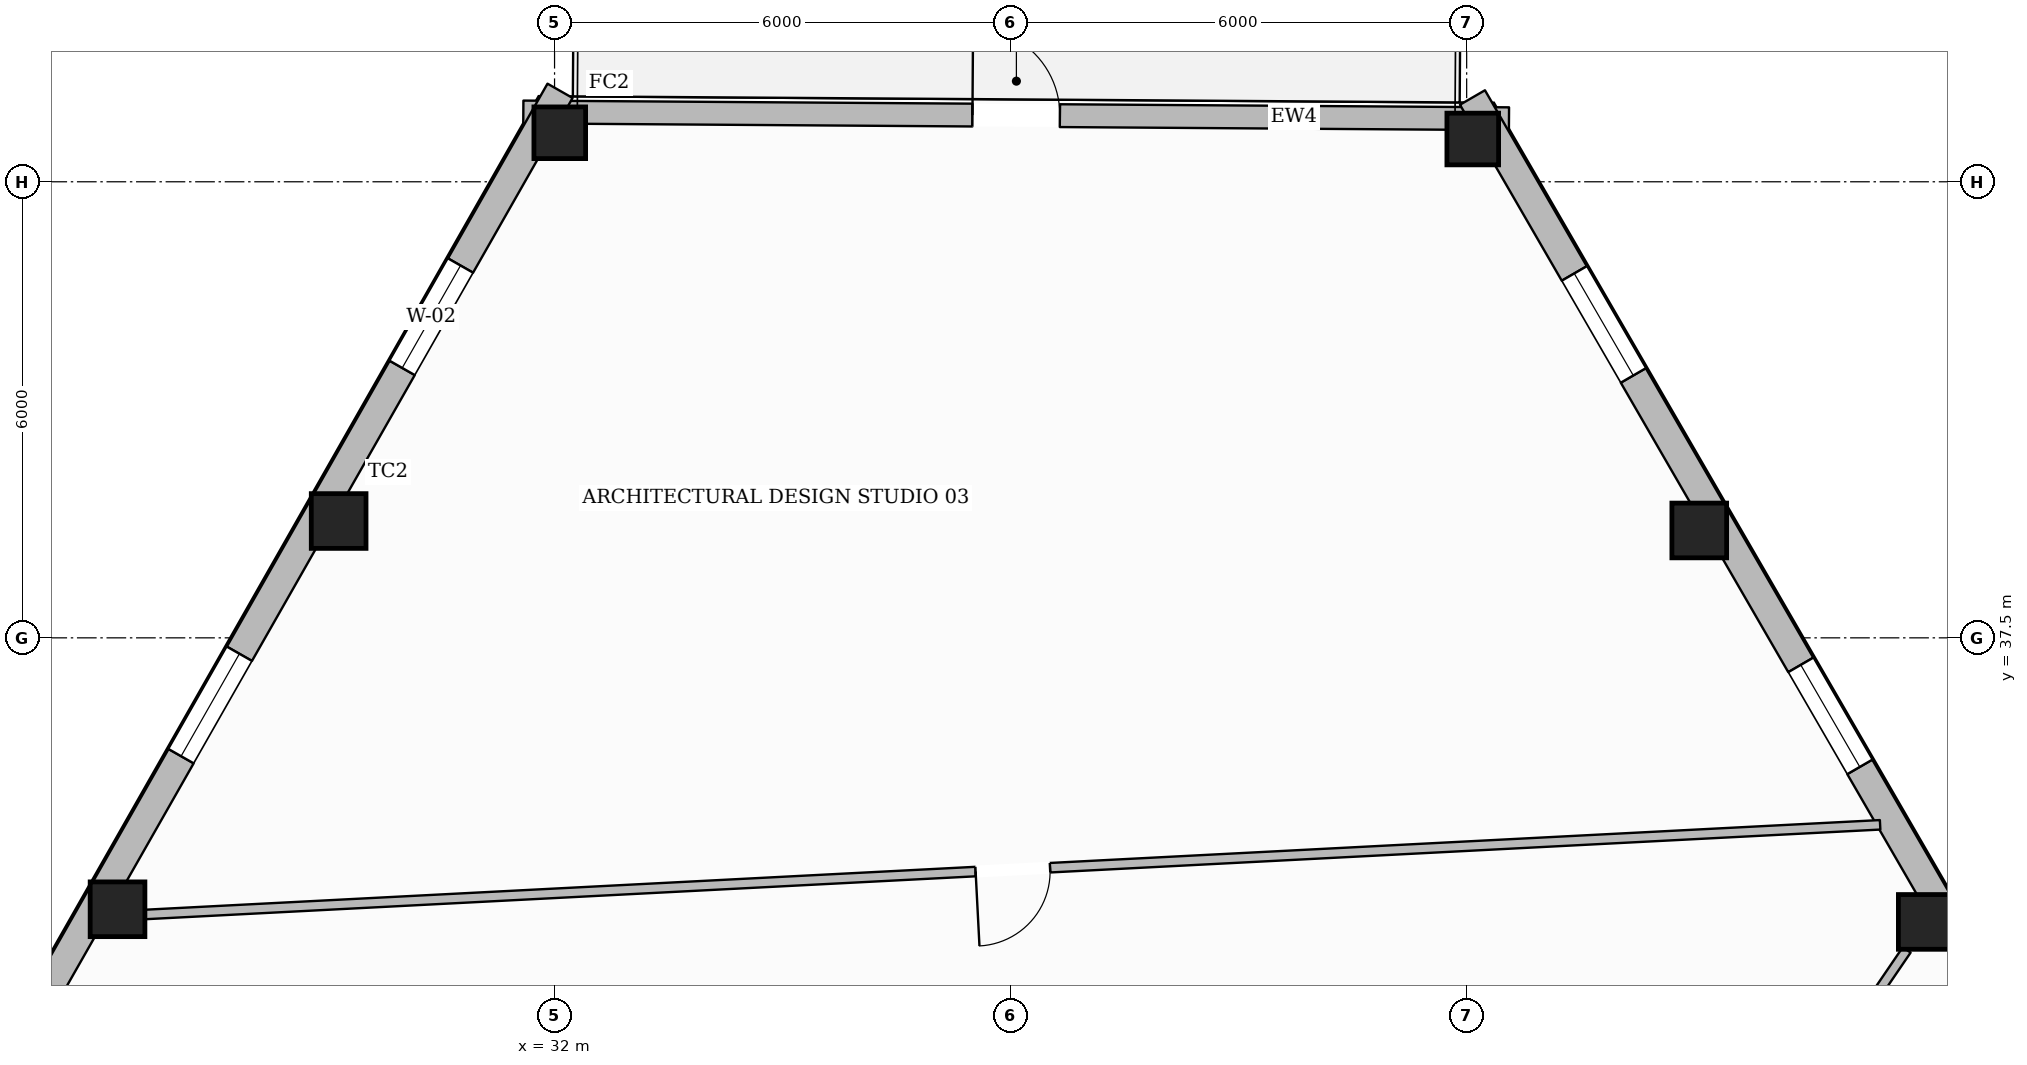
"""IFC4 building model, lengths in metres.
Left out: names, types, materials, properties, quantities, classifications, styles, units other than length and angle.
Written with IfcOpenShell. Run it as: python <this file> out.ifc"""

import sys

from ifc_helpers import new_model, si_unit, direction, frame, frame_2d, origin, origin_2d, place, context, subcontext, project, spatial, rectangle, hollow_rectangle, extrude, element, fill, save


model = new_model("IFC4")
c1 = context("Model", 3, precision=1e-05, world=origin(), true_north=direction((0.0, 1.0)))
c2 = subcontext(c1, "Body", "Model", "MODEL_VIEW")
j1 = project(units=[si_unit("LENGTHUNIT", "METRE"), si_unit("PLANEANGLEUNIT", "RADIAN")], contexts=[c1])
p1 = place(None, origin())
s1 = spatial("IfcSite", under=j1, at=p1, CompositionType="ELEMENT")
p2 = place(p1, origin())
s2 = spatial("IfcBuilding", under=s1, at=p2, CompositionType="ELEMENT")
p3 = place(p2, frame((0.0, 0.0, 112.45)))
s3 = spatial("IfcBuildingStorey", under=s2, at=p3, CompositionType="ELEMENT", Elevation=112.45)
p4 = place(p3, frame((32.069, 44.145, 0.0), z_axis=(0.0, 0.0, 1.0), x_axis=(1.0, 0.0, 0.0)))
e1 = element("IfcColumn", 1, at=p4, inside=s3, PredefinedType="COLUMN", context=c2, shape_type="SweptSolid", body=[
    extrude(hollow_rectangle(XDim=0.68, YDim=0.68, WallThickness=0.03, at=origin_2d()), origin(), (0.0, 0.0, 1.0), 3.6),
])
for number, where, z_axis, x_axis in (
    (2, (29.16, 39.037, 0.0), (0.0, 0.0, 1.0), (1.0, 0.0, 0.0)),
    (3, (26.25, 33.929, 0.0), (0.0, 0.0, 1.0), (1.0, 0.0, 0.0)),
    (4, (50.04, 33.763, 0.0), (0.0, 0.0, 1.0), (1.0, 0.0, 0.0)),
    (5, (47.06, 38.913, 0.0), (0.0, 0.0, 1.0), (1.0, 0.0, 0.0)),
):
    element("IfcColumn", number, at=place(p3, frame(where, z_axis=z_axis, x_axis=x_axis)), inside=s3, PredefinedType="COLUMN", context=c2, shape_type="SweptSolid", body=[
        extrude(hollow_rectangle(XDim=0.72, YDim=0.72, WallThickness=0.032, at=origin_2d()), origin(), (0.0, 0.0, 1.0), 3.6),
    ])
p5 = place(p3, frame((44.08, 44.062, 0.0), z_axis=(0.0, 0.0, 1.0), x_axis=(1.0, 0.0, 0.0)))
e6 = element("IfcColumn", 6, at=p5, inside=s3, PredefinedType="COLUMN", context=c2, shape_type="SweptSolid", body=[
    extrude(hollow_rectangle(XDim=0.68, YDim=0.68, WallThickness=0.03, at=origin_2d()), origin(), (0.0, 0.0, 1.0), 3.6),
])
p6 = place(p3, frame((31.589, 44.418, 0.0), z_axis=(0.0, 0.0, 1.0), x_axis=(0.999976517764, -0.00685302279, 0.0)))
e7 = element("IfcWall", 7, at=p6, inside=s3, PredefinedType="STANDARD", context=c2, shape_type="SweptSolid", body=[
    extrude(rectangle(XDim=12.968, YDim=0.3, at=frame_2d((6.484, 0.0))), origin(), (0.0, 0.0, 1.0), 3.059),
])
p7 = place(p6, frame((5.909, 0.0, 0.0)))
e8 = element("IfcOpeningElement", 8, at=p7, cuts=e7, PredefinedType="OPENING", context=c2, shape_type="SweptSolid", body=[
    extrude(rectangle(XDim=1.15, YDim=2.2, at=frame_2d((0.575, 1.1))), frame((0.0, 0.16, 0.0), z_axis=(0.0, -1.0, 0.0), x_axis=(1.0, 0.0, 0.0)), (0.0, 0.0, 1.0), 0.32),
])
p8 = place(p3, frame((14.144, 13.219, 0.0), z_axis=(0.0, 0.0, 1.0), x_axis=(0.494900960409, 0.868949388277, 0.0)))
e9 = element("IfcWall", 9, at=p8, inside=s3, PredefinedType="STANDARD", context=c2, shape_type="SweptSolid", body=[
    extrude(rectangle(XDim=36.225, YDim=0.38, at=frame_2d((18.113, 0.0))), origin(), (0.0, 0.0, 1.0), 3.059),
])
p9 = place(p8, frame((32.03, 0.0, 0.65)))
e10 = element("IfcOpeningElement", 10, at=p9, cuts=e9, PredefinedType="OPENING", context=c2, shape_type="SweptSolid", body=[
    extrude(rectangle(XDim=1.55, YDim=1.75, at=frame_2d((0.775, 0.875))), frame((0.0, 0.2, 0.0), z_axis=(0.0, -1.0, 0.0), x_axis=(1.0, 0.0, 0.0)), (0.0, 0.0, 1.0), 0.4),
])
p10 = place(p8, frame((26.152, 0.0, 0.65)))
e11 = element("IfcOpeningElement", 11, at=p10, cuts=e9, PredefinedType="OPENING", context=c2, shape_type="SweptSolid", body=[
    extrude(rectangle(XDim=1.55, YDim=1.75, at=frame_2d((0.775, 0.875))), frame((0.0, 0.2, 0.0), z_axis=(0.0, -1.0, 0.0), x_axis=(1.0, 0.0, 0.0)), (0.0, 0.0, 1.0), 0.4),
])
p11 = place(p8, frame((20.274, 0.0, 0.65)))
e12 = element("IfcOpeningElement", 12, at=p11, cuts=e9, PredefinedType="OPENING", context=c2, shape_type="SweptSolid", body=[
    extrude(rectangle(XDim=1.55, YDim=1.75, at=frame_2d((0.775, 0.875))), frame((0.0, 0.2, 0.0), z_axis=(0.0, -1.0, 0.0), x_axis=(1.0, 0.0, 0.0)), (0.0, 0.0, 1.0), 0.4),
])
p12 = place(p8, frame((8.518, 0.0, 0.65)))
e13 = element("IfcOpeningElement", 13, at=p12, cuts=e9, PredefinedType="OPENING", context=c2, shape_type="SweptSolid", body=[
    extrude(rectangle(XDim=1.55, YDim=1.75, at=frame_2d((0.775, 0.875))), frame((0.0, 0.2, 0.0), z_axis=(0.0, -1.0, 0.0), x_axis=(1.0, 0.0, 0.0)), (0.0, 0.0, 1.0), 0.4),
])
p13 = place(p8, frame((2.64, 0.0, 0.65)))
e14 = element("IfcOpeningElement", 14, at=p13, cuts=e9, PredefinedType="OPENING", context=c2, shape_type="SweptSolid", body=[
    extrude(rectangle(XDim=1.55, YDim=1.75, at=frame_2d((0.775, 0.875))), frame((0.0, 0.2, 0.0), z_axis=(0.0, -1.0, 0.0), x_axis=(1.0, 0.0, 0.0)), (0.0, 0.0, 1.0), 0.4),
])
p14 = place(p3, frame((44.076, 44.609, 0.0), z_axis=(0.0, 0.0, 1.0), x_axis=(0.500826973377, -0.865547423737, 0.0)))
e15 = element("IfcWall", 15, at=p14, inside=s3, PredefinedType="STANDARD", context=c2, shape_type="SweptSolid", body=[
    extrude(rectangle(XDim=36.65, YDim=0.38, at=frame_2d((18.325, 0.0))), origin(), (0.0, 0.0, 1.0), 3.059),
])
p15 = place(p14, frame((26.887, 0.0, 0.0)))
e16 = element("IfcOpeningElement", 16, at=p15, cuts=e15, PredefinedType="OPENING", context=c2, shape_type="SweptSolid", body=[
    extrude(rectangle(XDim=1.0, YDim=2.2, at=frame_2d((0.5, 1.1))), frame((0.0, 0.2, 0.0), z_axis=(0.0, -1.0, 0.0), x_axis=(1.0, 0.0, 0.0)), (0.0, 0.0, 1.0), 0.4),
])
p16 = place(p14, frame((32.424, 0.0, 0.65)))
e17 = element("IfcOpeningElement", 17, at=p16, cuts=e15, PredefinedType="OPENING", context=c2, shape_type="SweptSolid", body=[
    extrude(rectangle(XDim=1.55, YDim=1.75, at=frame_2d((0.775, 0.875))), frame((0.0, 0.2, 0.0), z_axis=(0.0, -1.0, 0.0), x_axis=(1.0, 0.0, 0.0)), (0.0, 0.0, 1.0), 0.4),
])
p17 = place(p14, frame((20.524, 0.0, 0.65)))
e18 = element("IfcOpeningElement", 18, at=p17, cuts=e15, PredefinedType="OPENING", context=c2, shape_type="SweptSolid", body=[
    extrude(rectangle(XDim=1.55, YDim=1.75, at=frame_2d((0.775, 0.875))), frame((0.0, 0.2, 0.0), z_axis=(0.0, -1.0, 0.0), x_axis=(1.0, 0.0, 0.0)), (0.0, 0.0, 1.0), 0.4),
])
p18 = place(p14, frame((8.625, 0.0, 0.65)))
e19 = element("IfcOpeningElement", 19, at=p18, cuts=e15, PredefinedType="OPENING", context=c2, shape_type="SweptSolid", body=[
    extrude(rectangle(XDim=1.55, YDim=1.75, at=frame_2d((0.775, 0.875))), frame((0.0, 0.2, 0.0), z_axis=(0.0, -1.0, 0.0), x_axis=(1.0, 0.0, 0.0)), (0.0, 0.0, 1.0), 0.4),
])
p19 = place(p14, frame((2.675, 0.0, 0.65)))
e20 = element("IfcOpeningElement", 20, at=p19, cuts=e15, PredefinedType="OPENING", context=c2, shape_type="SweptSolid", body=[
    extrude(rectangle(XDim=1.55, YDim=1.75, at=frame_2d((0.775, 0.875))), frame((0.0, 0.2, 0.0), z_axis=(0.0, -1.0, 0.0), x_axis=(1.0, 0.0, 0.0)), (0.0, 0.0, 1.0), 0.4),
])
p20 = place(p3, frame((44.156, 25.131, 0.0), z_axis=(0.0, 0.0, 1.0), x_axis=(0.563244412967, 0.826290343197, 0.0)))
e21 = element("IfcWall", 21, at=p20, inside=s3, PredefinedType="PARTITIONING", context=c2, shape_type="SweptSolid", body=[
    extrude(rectangle(XDim=10.001, YDim=0.125, at=frame_2d((5.001, 0.0))), origin(), (0.0, 0.0, 1.0), 3.6),
])
p21 = place(p3, frame((49.439, 35.04, 0.0), z_axis=(0.0, 0.0, 1.0), x_axis=(-0.998667112639, -0.051613933513, 0.0)))
e22 = element("IfcWall", 22, at=p21, inside=s3, PredefinedType="PARTITIONING", context=c2, shape_type="SweptSolid", body=[
    extrude(rectangle(XDim=22.851, YDim=0.125, at=frame_2d((11.426, 0.0))), origin(), (0.0, 0.0, 1.0), 3.6),
])
p22 = place(p21, frame((10.936, 0.0, 0.0)))
e23 = element("IfcOpeningElement", 23, at=p22, cuts=e22, PredefinedType="OPENING", context=c2, shape_type="SweptSolid", body=[
    extrude(rectangle(XDim=0.98, YDim=2.15, at=frame_2d((0.49, 1.075))), frame((0.0, 0.073, 0.0), z_axis=(0.0, -1.0, 0.0), x_axis=(1.0, 0.0, 0.0)), (0.0, 0.0, 1.0), 0.145),
])
p23 = place(p7, origin())
e24 = element("IfcDoor", 24, at=p23, inside=s3, OperationType="SINGLE_SWING_LEFT", PredefinedType="DOOR", context=c2, shape_type="SweptSolid", body=[
    extrude(rectangle(XDim=1.15, YDim=2.2, at=frame_2d((0.575, 1.1))), frame((0.0, 0.025, 0.0), z_axis=(0.0, -1.0, 0.0), x_axis=(1.0, 0.0, 0.0)), (0.0, 0.0, 1.0), 0.05),
])
fill(e8, e24)
p24 = place(p9, origin())
e25 = element("IfcWindow", 25, at=p24, inside=s3, PartitioningType="SINGLE_PANEL", PredefinedType="WINDOW", context=c2, shape_type="SweptSolid", body=[
    extrude(rectangle(XDim=1.55, YDim=1.75, at=frame_2d((0.775, 0.875))), frame((0.0, 0.03, 0.0), z_axis=(0.0, -1.0, 0.0), x_axis=(1.0, 0.0, 0.0)), (0.0, 0.0, 1.0), 0.06),
])
fill(e10, e25)
p25 = place(p10, origin())
e26 = element("IfcWindow", 26, at=p25, inside=s3, PartitioningType="SINGLE_PANEL", PredefinedType="WINDOW", context=c2, shape_type="SweptSolid", body=[
    extrude(rectangle(XDim=1.55, YDim=1.75, at=frame_2d((0.775, 0.875))), frame((0.0, 0.03, 0.0), z_axis=(0.0, -1.0, 0.0), x_axis=(1.0, 0.0, 0.0)), (0.0, 0.0, 1.0), 0.06),
])
fill(e11, e26)
p26 = place(p18, origin())
e27 = element("IfcWindow", 27, at=p26, inside=s3, PartitioningType="SINGLE_PANEL", PredefinedType="WINDOW", context=c2, shape_type="SweptSolid", body=[
    extrude(rectangle(XDim=1.55, YDim=1.75, at=frame_2d((0.775, 0.875))), frame((0.0, 0.03, 0.0), z_axis=(0.0, -1.0, 0.0), x_axis=(1.0, 0.0, 0.0)), (0.0, 0.0, 1.0), 0.06),
])
fill(e19, e27)
p27 = place(p19, origin())
e28 = element("IfcWindow", 28, at=p27, inside=s3, PartitioningType="SINGLE_PANEL", PredefinedType="WINDOW", context=c2, shape_type="SweptSolid", body=[
    extrude(rectangle(XDim=1.55, YDim=1.75, at=frame_2d((0.775, 0.875))), frame((0.0, 0.03, 0.0), z_axis=(0.0, -1.0, 0.0), x_axis=(1.0, 0.0, 0.0)), (0.0, 0.0, 1.0), 0.06),
])
fill(e20, e28)
p28 = place(p22, origin())
e29 = element("IfcDoor", 29, at=p28, inside=s3, OperationType="SINGLE_SWING_RIGHT", PredefinedType="DOOR", context=c2, shape_type="SweptSolid", body=[
    extrude(rectangle(XDim=0.98, YDim=2.15, at=frame_2d((0.49, 1.075))), frame((0.0, 0.025, 0.0), z_axis=(0.0, -1.0, 0.0), x_axis=(1.0, 0.0, 0.0)), (0.0, 0.0, 1.0), 0.05),
])
fill(e23, e29)
save(model, sys.argv[1])
